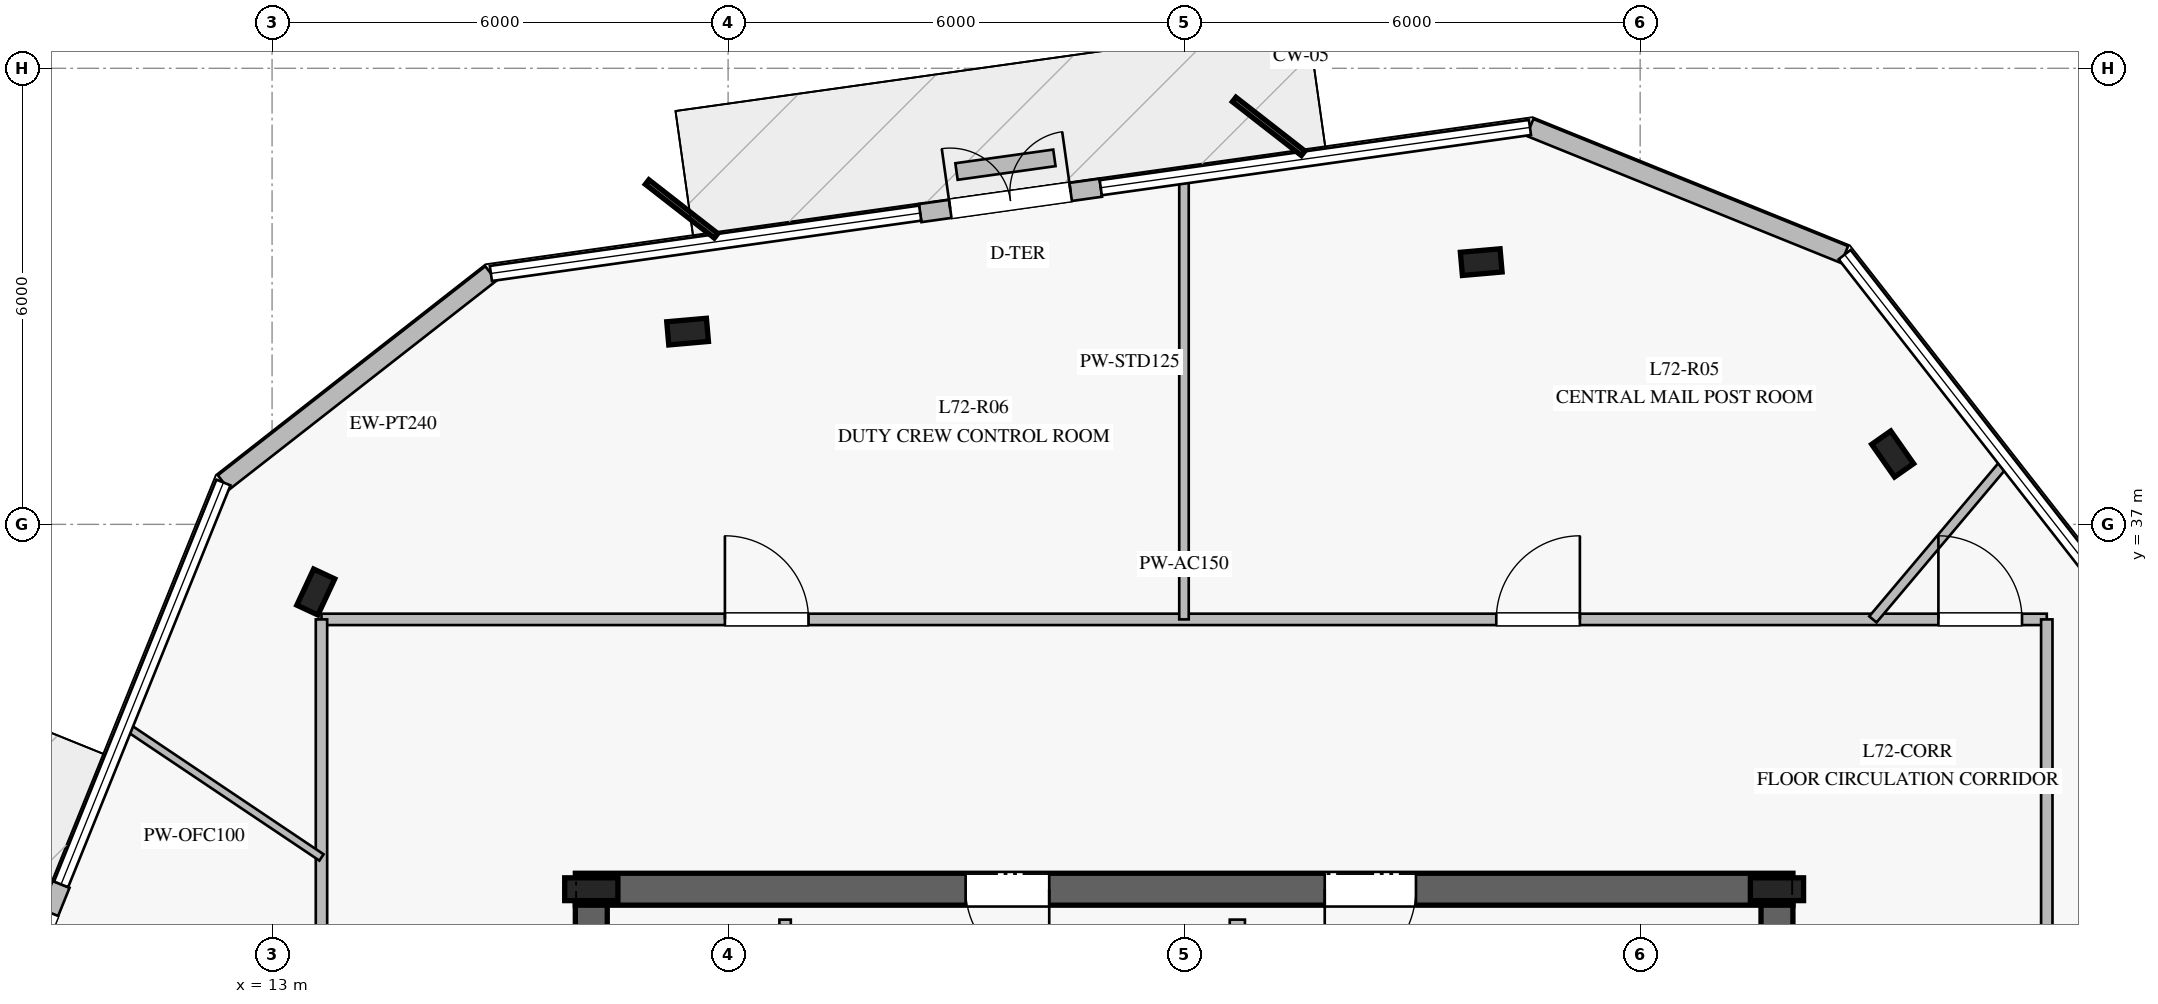
"""IFC4 building model, lengths in metres.
Left out: names, types, materials, properties, quantities, classifications, styles, units other than length and angle.
Written with IfcOpenShell. Run it as: python <this file> out.ifc"""

import sys

from ifc_helpers import new_model, si_unit, direction, frame, frame_2d, origin, origin_2d, place, context, subcontext, project, spatial, rectangle, i_section, extrude, element, fill, save


model = new_model("IFC4")
c1 = context("Model", 3, precision=1e-05, world=origin(), true_north=direction((0.0, 1.0)))
c2 = subcontext(c1, "Body", "Model", "MODEL_VIEW")
j1 = project(units=[si_unit("LENGTHUNIT", "METRE"), si_unit("PLANEANGLEUNIT", "RADIAN")], contexts=[c1])
p1 = place(None, origin())
s1 = spatial("IfcSite", under=j1, at=p1, CompositionType="ELEMENT")
p2 = place(p1, origin())
s2 = spatial("IfcBuilding", under=s1, at=p2, CompositionType="ELEMENT")
p3 = place(p2, frame((0.0, 0.0, 298.2)))
s3 = spatial("IfcBuildingStorey", under=s2, at=p3, CompositionType="ELEMENT", Elevation=298.2)
p4 = place(p3, frame((33.01, 32.2, 0.0), z_axis=(0.0, 0.0, 1.0), x_axis=(-1.0, 0.0, 0.0)))
e1 = element("IfcWall", 1, at=p4, inside=s3, PredefinedType="SHEAR", context=c2, shape_type="SweptSolid", body=[
    extrude(rectangle(XDim=16.02, YDim=0.42, at=frame_2d((8.01, 0.0))), origin(), (0.0, 0.0, 1.0), 3.78),
])
p5 = place(p4, frame((4.96, 0.0, 0.0)))
e2 = element("IfcOpeningElement", 2, at=p5, cuts=e1, PredefinedType="OPENING", context=c2, shape_type="SweptSolid", body=[
    extrude(rectangle(XDim=1.2, YDim=2.25, at=frame_2d((0.6, 1.125))), frame((0.0, 0.22, 0.0), z_axis=(0.0, -1.0, 0.0), x_axis=(1.0, 0.0, 0.0)), (0.0, 0.0, 1.0), 0.44),
])
p6 = place(p4, frame((9.785, 0.0, 0.0)))
e3 = element("IfcOpeningElement", 3, at=p6, cuts=e1, PredefinedType="OPENING", context=c2, shape_type="SweptSolid", body=[
    extrude(rectangle(XDim=1.1, YDim=2.2, at=frame_2d((0.55, 1.1))), frame((0.0, 0.22, 0.0), z_axis=(0.0, -1.0, 0.0), x_axis=(1.0, 0.0, 0.0)), (0.0, 0.0, 1.0), 0.44),
])
p7 = place(p3, frame((17.2, 31.99, 0.0), z_axis=(0.0, 0.0, 1.0), x_axis=(0.0, -1.0, 0.0)))
e4 = element("IfcWall", 4, at=p7, inside=s3, PredefinedType="SHEAR", context=c2, shape_type="SweptSolid", body=[
    extrude(rectangle(XDim=13.98, YDim=0.42, at=frame_2d((6.99, 0.0))), origin(), (0.0, 0.0, 1.0), 3.78),
])
p8 = place(p7, frame((2.14, 0.0, 0.0)))
e5 = element("IfcOpeningElement", 5, at=p8, cuts=e4, PredefinedType="OPENING", context=c2, shape_type="SweptSolid", body=[
    extrude(rectangle(XDim=1.5, YDim=2.2, at=frame_2d((0.75, 1.1))), frame((0.0, 0.22, 0.0), z_axis=(0.0, -1.0, 0.0), x_axis=(1.0, 0.0, 0.0)), (0.0, 0.0, 1.0), 0.44),
])
p9 = place(p3, frame((32.8, 18.01, 0.0), z_axis=(0.0, 0.0, 1.0), x_axis=(0.0, 1.0, 0.0)))
e6 = element("IfcWall", 6, at=p9, inside=s3, PredefinedType="SHEAR", context=c2, shape_type="SweptSolid", body=[
    extrude(rectangle(XDim=13.98, YDim=0.42, at=frame_2d((6.99, 0.0))), origin(), (0.0, 0.0, 1.0), 3.78),
])
for number, where, z_axis, x_axis in (
    (7, (32.8, 32.2, 0.0), (0.0, 0.0, 1.0), (1.0, 0.0, 0.0)),
    (8, (17.2, 32.2, 0.0), (0.0, 0.0, 1.0), (1.0, 0.0, 0.0)),
):
    element("IfcColumn", number, at=place(p3, frame(where, z_axis=z_axis, x_axis=x_axis)), inside=s3, PredefinedType="COLUMN", context=c2, shape_type="SweptSolid", body=[
        extrude(i_section(OverallWidth=0.3, OverallDepth=0.7, WebThickness=0.017, FlangeThickness=0.032, at=origin_2d()), origin(), (0.0, 0.0, 1.0), 4.0),
    ])
for number, where, z_axis, x_axis in (
    (9, (28.909, 40.45, 0.0), (0.0, 0.0, 1.0), (0.996, 0.087, 0.0)),
    (10, (18.467, 39.536, 0.0), (0.0, 0.0, 1.0), (0.996, 0.087, 0.0)),
    (11, (13.575, 36.11, 0.0), (0.0, 0.0, 1.0), (0.423, 0.906, 0.0)),
    (12, (34.322, 37.926, 0.0), (0.0, 0.0, 1.0), (-0.574, 0.819, 0.0)),
):
    element("IfcColumn", number, at=place(p3, frame(where, z_axis=z_axis, x_axis=x_axis)), inside=s3, PredefinedType="COLUMN", context=c2, shape_type="SweptSolid", body=[
        extrude(i_section(OverallWidth=0.306, OverallDepth=0.524, WebThickness=0.021, FlangeThickness=0.04, at=origin_2d()), origin(), (0.0, 0.0, 1.0), 4.0),
    ])
p10 = place(p3, frame((23.903, 41.429, 0.0), z_axis=(0.0, 0.0, 1.0), x_axis=(-0.990264470021, -0.139198704787, 0.0)))
e13 = element("IfcWall", 13, at=p10, inside=s3, PredefinedType="STANDARD", context=c2, shape_type="SweptSolid", body=[
    extrude(rectangle(XDim=2.399, YDim=0.24, at=frame_2d((1.2, 0.0))), origin(), (0.0, 0.0, 1.0), 3.78),
])
p11 = place(p10, frame((0.4, 0.0, 0.0)))
e14 = element("IfcOpeningElement", 14, at=p11, cuts=e13, PredefinedType="OPENING", context=c2, shape_type="SweptSolid", body=[
    extrude(rectangle(XDim=1.6, YDim=2.25, at=frame_2d((0.8, 1.125))), frame((0.0, 0.13, 0.0), z_axis=(0.0, -1.0, 0.0), x_axis=(1.0, 0.0, 0.0)), (0.0, 0.0, 1.0), 0.26),
])
p12 = place(p3, frame((15.879, 40.301, 0.0), z_axis=(0.0, 0.0, 1.0), x_axis=(-0.78792242083, -0.615774519408, 0.0)))
e15 = element("IfcWall", 15, at=p12, inside=s3, PredefinedType="STANDARD", context=c2, shape_type="SweptSolid", body=[
    extrude(rectangle(XDim=4.466, YDim=0.24, at=frame_2d((2.233, 0.0))), origin(), (0.0, 0.0, 1.0), 3.78),
])
p13 = place(p3, frame((10.224, 32.264, 0.0), z_axis=(0.0, 0.0, 1.0), x_axis=(-0.374703586724, -0.927144660825, 0.0)))
e16 = element("IfcWall", 16, at=p13, inside=s3, PredefinedType="STANDARD", context=c2, shape_type="SweptSolid", body=[
    extrude(rectangle(XDim=2.4, YDim=0.24, at=frame_2d((1.2, 0.0))), origin(), (0.0, 0.0, 1.0), 3.78),
])
p14 = place(p13, frame((0.4, 0.0, 0.0)))
e17 = element("IfcOpeningElement", 17, at=p14, cuts=e16, PredefinedType="OPENING", context=c2, shape_type="SweptSolid", body=[
    extrude(rectangle(XDim=1.6, YDim=2.25, at=frame_2d((0.8, 1.125))), frame((0.0, 0.13, 0.0), z_axis=(0.0, -1.0, 0.0), x_axis=(1.0, 0.0, 0.0)), (0.0, 0.0, 1.0), 0.26),
])
p15 = place(p3, frame((33.69, 40.549, 0.0), z_axis=(0.0, 0.0, 1.0), x_axis=(-0.927166243324, 0.374650179823, 0.0)))
e18 = element("IfcWall", 18, at=p15, inside=s3, PredefinedType="STANDARD", context=c2, shape_type="SweptSolid", body=[
    extrude(rectangle(XDim=4.465, YDim=0.24, at=frame_2d((2.232, 0.0))), origin(), (0.0, 0.0, 1.0), 3.78),
])
p16 = place(p3, frame((23.293, 41.822, 0.0), z_axis=(0.0, 0.0, 1.0), x_axis=(-0.990383971487, -0.138345903523, 0.0)))
e19 = element("IfcWall", 19, at=p16, inside=s3, PredefinedType="USERDEFINED", context=c2, shape_type="SweptSolid", body=[
    extrude(rectangle(XDim=1.301, YDim=0.22, at=frame_2d((0.65, 0.0))), origin(), (0.0, 0.0, 1.0), 0.4),
])
p17 = place(p3, frame((25.7, 26.65, 0.0), z_axis=(0.0, 0.0, 1.0), x_axis=(0.0, 1.0, 0.0)))
e20 = element("IfcWall", 20, at=p17, inside=s3, PredefinedType="PARTITIONING", context=c2, shape_type="SweptSolid", body=[
    extrude(rectangle(XDim=5.15, YDim=0.2, at=frame_2d((2.575, 0.0))), origin(), (0.0, 0.0, 1.0), 3.78),
])
p18 = place(p3, frame((19.75, 29.39, 0.0), z_axis=(0.0, 0.0, 1.0), x_axis=(0.0, 1.0, 0.0)))
e21 = element("IfcWall", 21, at=p18, inside=s3, PredefinedType="PARTITIONING", context=c2, shape_type="SweptSolid", body=[
    extrude(rectangle(XDim=2.41, YDim=0.15, at=frame_2d((1.205, 0.0))), origin(), (0.0, 0.0, 1.0), 3.78),
])
p19 = place(p3, frame((13.65, 35.75, 0.0), z_axis=(0.0, 0.0, 1.0), x_axis=(1.0, 0.0, 0.0)))
e22 = element("IfcWall", 22, at=p19, inside=s3, PredefinedType="PARTITIONING", context=c2, shape_type="SweptSolid", body=[
    extrude(rectangle(XDim=22.7, YDim=0.15, at=frame_2d((11.35, 0.0))), origin(), (0.0, 0.0, 1.0), 3.28),
])
p20 = place(p19, frame((21.274, 0.0, 0.0)))
e23 = element("IfcOpeningElement", 23, at=p20, cuts=e22, PredefinedType="OPENING", context=c2, shape_type="SweptSolid", body=[
    extrude(rectangle(XDim=1.1, YDim=2.2, at=frame_2d((0.55, 1.1))), frame((0.0, 0.085, 0.0), z_axis=(0.0, -1.0, 0.0), x_axis=(1.0, 0.0, 0.0)), (0.0, 0.0, 1.0), 0.17),
])
p21 = place(p19, frame((15.457, 0.0, 0.0)))
e24 = element("IfcOpeningElement", 24, at=p21, cuts=e22, PredefinedType="OPENING", context=c2, shape_type="SweptSolid", body=[
    extrude(rectangle(XDim=1.1, YDim=2.2, at=frame_2d((0.55, 1.1))), frame((0.0, 0.085, 0.0), z_axis=(0.0, -1.0, 0.0), x_axis=(1.0, 0.0, 0.0)), (0.0, 0.0, 1.0), 0.17),
])
p22 = place(p19, frame((5.308, 0.0, 0.0)))
e25 = element("IfcOpeningElement", 25, at=p22, cuts=e22, PredefinedType="OPENING", context=c2, shape_type="SweptSolid", body=[
    extrude(rectangle(XDim=1.1, YDim=2.2, at=frame_2d((0.55, 1.1))), frame((0.0, 0.085, 0.0), z_axis=(0.0, -1.0, 0.0), x_axis=(1.0, 0.0, 0.0)), (0.0, 0.0, 1.0), 0.17),
])
p23 = place(p3, frame((36.35, 35.75, 0.0), z_axis=(0.0, 0.0, 1.0), x_axis=(0.0, -1.0, 0.0)))
e26 = element("IfcWall", 26, at=p23, inside=s3, PredefinedType="PARTITIONING", context=c2, shape_type="SweptSolid", body=[
    extrude(rectangle(XDim=21.5, YDim=0.15, at=frame_2d((10.75, 0.0))), origin(), (0.0, 0.0, 1.0), 3.25),
])
p24 = place(p23, frame((15.222, 0.0, 0.0)))
e27 = element("IfcOpeningElement", 27, at=p24, cuts=e26, PredefinedType="OPENING", context=c2, shape_type="SweptSolid", body=[
    extrude(rectangle(XDim=1.1, YDim=2.2, at=frame_2d((0.55, 1.1))), frame((0.0, 0.085, 0.0), z_axis=(0.0, -1.0, 0.0), x_axis=(1.0, 0.0, 0.0)), (0.0, 0.0, 1.0), 0.17),
])
p25 = place(p3, frame((13.65, 14.25, 0.0), z_axis=(0.0, 0.0, 1.0), x_axis=(0.0, 1.0, 0.0)))
e28 = element("IfcWall", 28, at=p25, inside=s3, PredefinedType="PARTITIONING", context=c2, shape_type="SweptSolid", body=[
    extrude(rectangle(XDim=21.5, YDim=0.15, at=frame_2d((10.75, 0.0))), origin(), (0.0, 0.0, 1.0), 3.25),
])
p26 = place(p25, frame((12.397, 0.0, 0.0)))
e29 = element("IfcOpeningElement", 29, at=p26, cuts=e28, PredefinedType="OPENING", context=c2, shape_type="SweptSolid", body=[
    extrude(rectangle(XDim=1.1, YDim=2.2, at=frame_2d((0.55, 1.1))), frame((0.0, 0.085, 0.0), z_axis=(0.0, -1.0, 0.0), x_axis=(1.0, 0.0, 0.0)), (0.0, 0.0, 1.0), 0.17),
])
p27 = place(p3, frame((24.998, 35.75, 0.0), z_axis=(0.0, 0.0, 1.0), x_axis=(0.0, 1.0, 0.0)))
e30 = element("IfcWall", 30, at=p27, inside=s3, PredefinedType="PARTITIONING", context=c2, shape_type="SweptSolid", body=[
    extrude(rectangle(XDim=5.816, YDim=0.125, at=frame_2d((2.908, 0.0))), origin(), (0.0, 0.0, 1.0), 3.28),
])
p28 = place(p3, frame((13.65, 32.618, 0.0), z_axis=(0.0, 0.0, 1.0), x_axis=(-0.830322330951, 0.55728343482, 0.0)))
e31 = element("IfcWall", 31, at=p28, inside=s3, PredefinedType="MOVABLE", context=c2, shape_type="SweptSolid", body=[
    extrude(rectangle(XDim=3.094, YDim=0.1, at=frame_2d((1.547, 0.0))), origin(), (0.0, 0.0, 1.0), 3.28),
])
p29 = place(p3, frame((34.062, 35.75, 0.0), z_axis=(0.0, 0.0, 1.0), x_axis=(0.644438862716, 0.764655839068, 0.0)))
e32 = element("IfcWall", 32, at=p29, inside=s3, PredefinedType="PARTITIONING", context=c2, shape_type="SweptSolid", body=[
    extrude(rectangle(XDim=2.703, YDim=0.125, at=frame_2d((1.352, 0.0))), origin(), (0.0, 0.0, 1.0), 3.28),
])
p30 = place(p11, frame((1.6, 0.0, 0.0), z_axis=(0.0, 0.0, 1.0), x_axis=(-1.0, 0.0, 0.0)))
e33 = element("IfcDoor", 33, at=p30, inside=s3, OperationType="DOUBLE_DOOR_SINGLE_SWING", PredefinedType="DOOR", context=c2, shape_type="SweptSolid", body=[
    extrude(rectangle(XDim=1.6, YDim=2.25, at=frame_2d((0.8, 1.125))), frame((0.0, 0.025, 0.0), z_axis=(0.0, -1.0, 0.0), x_axis=(1.0, 0.0, 0.0)), (0.0, 0.0, 1.0), 0.05),
])
fill(e14, e33)
p31 = place(p5, origin())
e34 = element("IfcDoor", 34, at=p31, inside=s3, OperationType="SINGLE_SWING_RIGHT", PredefinedType="DOOR", context=c2, shape_type="SweptSolid", body=[
    extrude(rectangle(XDim=1.2, YDim=2.25, at=frame_2d((0.6, 1.125))), frame((0.0, 0.025, 0.0), z_axis=(0.0, -1.0, 0.0), x_axis=(1.0, 0.0, 0.0)), (0.0, 0.0, 1.0), 0.05),
])
fill(e2, e34)
p32 = place(p6, origin())
e35 = element("IfcDoor", 35, at=p32, inside=s3, OperationType="SINGLE_SWING_LEFT", PredefinedType="DOOR", context=c2, shape_type="SweptSolid", body=[
    extrude(rectangle(XDim=1.1, YDim=2.2, at=frame_2d((0.55, 1.1))), frame((0.0, 0.025, 0.0), z_axis=(0.0, -1.0, 0.0), x_axis=(1.0, 0.0, 0.0)), (0.0, 0.0, 1.0), 0.05),
])
fill(e3, e35)
p33 = place(p20, origin())
e36 = element("IfcDoor", 36, at=p33, inside=s3, OperationType="SINGLE_SWING_LEFT", PredefinedType="DOOR", context=c2, shape_type="SweptSolid", body=[
    extrude(rectangle(XDim=1.1, YDim=2.2, at=frame_2d((0.55, 1.1))), frame((0.0, 0.025, 0.0), z_axis=(0.0, -1.0, 0.0), x_axis=(1.0, 0.0, 0.0)), (0.0, 0.0, 1.0), 0.05),
])
fill(e23, e36)
p34 = place(p21, origin())
e37 = element("IfcDoor", 37, at=p34, inside=s3, OperationType="SINGLE_SWING_RIGHT", PredefinedType="DOOR", context=c2, shape_type="SweptSolid", body=[
    extrude(rectangle(XDim=1.1, YDim=2.2, at=frame_2d((0.55, 1.1))), frame((0.0, 0.025, 0.0), z_axis=(0.0, -1.0, 0.0), x_axis=(1.0, 0.0, 0.0)), (0.0, 0.0, 1.0), 0.05),
])
fill(e24, e37)
p35 = place(p22, origin())
e38 = element("IfcDoor", 38, at=p35, inside=s3, OperationType="SINGLE_SWING_LEFT", PredefinedType="DOOR", context=c2, shape_type="SweptSolid", body=[
    extrude(rectangle(XDim=1.1, YDim=2.2, at=frame_2d((0.55, 1.1))), frame((0.0, 0.025, 0.0), z_axis=(0.0, -1.0, 0.0), x_axis=(1.0, 0.0, 0.0)), (0.0, 0.0, 1.0), 0.05),
])
fill(e25, e38)
save(model, sys.argv[1])
